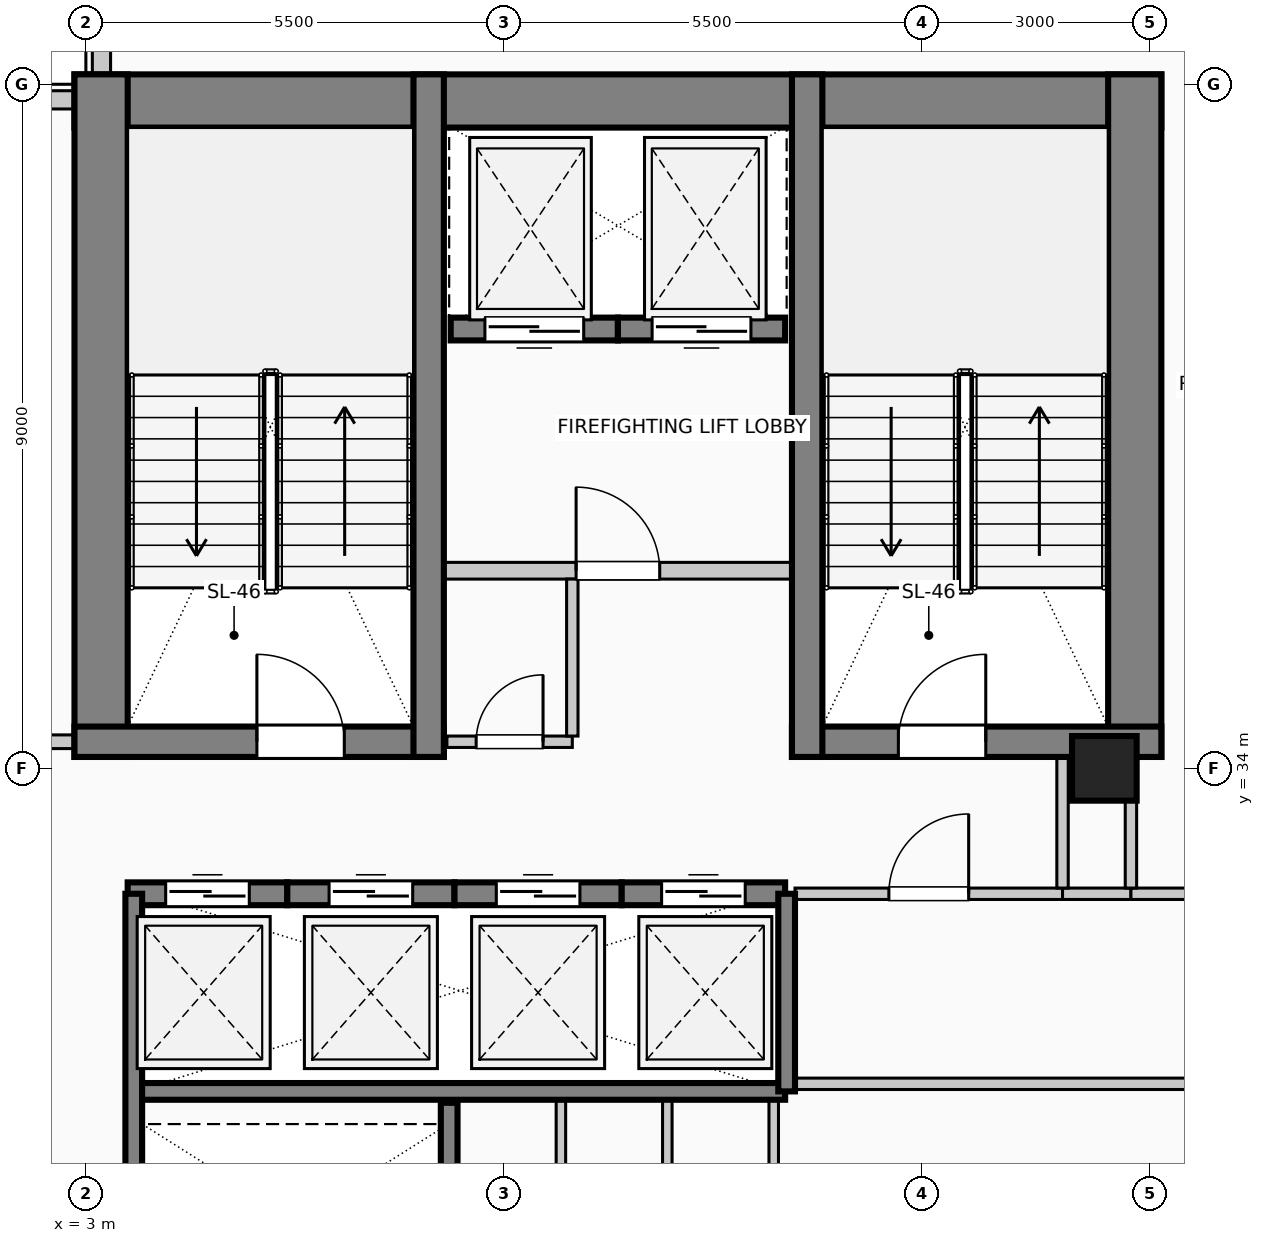
"""IFC4 building model, lengths in metres.
Left out: names, types, materials, properties, quantities, classifications, styles, units other than length and angle.
Written with IfcOpenShell. Run it as: python <this file> out.ifc"""

import sys

from ifc_helpers import new_model, si_unit, direction, frame, frame_2d, origin, origin_2d, place, context, subcontext, project, spatial, rectangle, circle, extrude, element, fill, save


model = new_model("IFC4")
c1 = context("Model", 3, precision=1e-05, world=origin(), true_north=direction((0.0, 1.0)))
c2 = subcontext(c1, "Body", "Model", "MODEL_VIEW")
j1 = project(units=[si_unit("LENGTHUNIT", "METRE"), si_unit("PLANEANGLEUNIT", "RADIAN")], contexts=[c1])
p1 = place(None, origin())
s1 = spatial("IfcSite", under=j1, at=p1, CompositionType="ELEMENT")
p2 = place(p1, origin())
s2 = spatial("IfcBuilding", under=s1, at=p2, CompositionType="ELEMENT")
p3 = place(p2, frame((0.0, 0.0, 256.6)))
s3 = spatial("IfcBuildingStorey", under=s2, at=p3, CompositionType="ELEMENT", Elevation=256.6)
p4 = place(p3, frame((2.85, 42.78, 0.0), z_axis=(0.0, 0.0, 1.0), x_axis=(1.0, 0.0, 0.0)))
e1 = element("IfcWall", 1, at=p4, inside=s3, PredefinedType="SHEAR", context=c2, shape_type="SweptSolid", body=[
    extrude(rectangle(XDim=14.3, YDim=0.7, at=frame_2d((7.15, 0.0))), origin(), (0.0, 0.0, 1.0), 4.0),
])
for number, where, z_axis, x_axis in (
    (2, (3.2, 34.15, 0.0), (0.0, 0.0, 1.0), (0.0, 1.0, 0.0)),
    (3, (16.8, 34.15, 0.0), (0.0, 0.0, 1.0), (0.0, 1.0, 0.0)),
):
    element("IfcWall", number, at=place(p3, frame(where, z_axis=z_axis, x_axis=x_axis)), inside=s3, PredefinedType="SHEAR", context=c2, shape_type="SweptSolid", body=[
        extrude(rectangle(XDim=8.98, YDim=0.7, at=frame_2d((4.49, 0.0))), origin(), (0.0, 0.0, 1.0), 4.0),
    ])
p5 = place(p3, frame((2.85, 34.35, 0.0), z_axis=(0.0, 0.0, 1.0), x_axis=(1.0, 0.0, 0.0)))
e4 = element("IfcWall", 4, at=p5, inside=s3, PredefinedType="SHEAR", context=c2, shape_type="SweptSolid", body=[
    extrude(rectangle(XDim=4.86, YDim=0.4, at=frame_2d((2.43, 0.0))), origin(), (0.0, 0.0, 1.0), 4.0),
])
p6 = place(p5, frame((2.4, 0.0, 0.0)))
e5 = element("IfcOpeningElement", 5, at=p6, cuts=e4, PredefinedType="OPENING", context=c2, shape_type="SweptSolid", body=[
    extrude(rectangle(XDim=1.15, YDim=2.2, at=frame_2d((0.575, 1.1))), frame((0.0, 0.21, 0.0), z_axis=(0.0, -1.0, 0.0), x_axis=(1.0, 0.0, 0.0)), (0.0, 0.0, 1.0), 0.42),
])
p7 = place(p3, frame((12.29, 34.35, 0.0), z_axis=(0.0, 0.0, 1.0), x_axis=(1.0, 0.0, 0.0)))
e6 = element("IfcWall", 6, at=p7, inside=s3, PredefinedType="SHEAR", context=c2, shape_type="SweptSolid", body=[
    extrude(rectangle(XDim=4.86, YDim=0.4, at=frame_2d((2.43, 0.0))), origin(), (0.0, 0.0, 1.0), 4.0),
])
p8 = place(p7, frame((1.4, 0.0, 0.0)))
e7 = element("IfcOpeningElement", 7, at=p8, cuts=e6, PredefinedType="OPENING", context=c2, shape_type="SweptSolid", body=[
    extrude(rectangle(XDim=1.15, YDim=2.2, at=frame_2d((0.575, 1.1))), frame((0.0, 0.21, 0.0), z_axis=(0.0, -1.0, 0.0), x_axis=(1.0, 0.0, 0.0)), (0.0, 0.0, 1.0), 0.42),
])
for number, where, z_axis, x_axis in (
    (8, (7.51, 34.15, 0.0), (0.0, 0.0, 1.0), (0.0, 1.0, 0.0)),
    (9, (12.49, 34.15, 0.0), (0.0, 0.0, 1.0), (0.0, 1.0, 0.0)),
):
    element("IfcWall", number, at=place(p3, frame(where, z_axis=z_axis, x_axis=x_axis)), inside=s3, PredefinedType="SHEAR", context=c2, shape_type="SweptSolid", body=[
        extrude(rectangle(XDim=8.98, YDim=0.4, at=frame_2d((4.49, 0.0))), origin(), (0.0, 0.0, 1.0), 4.0),
    ])
p9 = place(p3, frame((16.4, 34.0, 0.0), z_axis=(0.0, 0.0, 1.0), x_axis=(1.0, 0.0, 0.0)))
e10 = element("IfcColumn", 10, at=p9, inside=s3, PredefinedType="COLUMN", context=c2, shape_type="SweptSolid", body=[
    extrude(circle(Radius=0.425, at=origin_2d()), origin(), (0.0, 0.0, 1.0), 4.0),
])
p10 = place(p3, frame((0.6, 42.795, 0.0), z_axis=(0.0, 0.0, 1.0), x_axis=(1.0, 0.0, 0.0)))
e11 = element("IfcWall", 11, at=p10, inside=s3, PredefinedType="SOLIDWALL", context=c2, shape_type="SweptSolid", body=[
    extrude(rectangle(XDim=2.245, YDim=0.24, at=frame_2d((1.123, 0.0))), origin(), (0.0, 0.0, 1.0), 3.75),
])
p11 = place(p3, frame((3.205, 43.135, 0.0), z_axis=(0.0, 0.0, 1.0), x_axis=(0.0, 1.0, 0.0)))
e12 = element("IfcWall", 12, at=p11, inside=s3, PredefinedType="SOLIDWALL", context=c2, shape_type="SweptSolid", body=[
    extrude(rectangle(XDim=2.265, YDim=0.24, at=frame_2d((1.132, 0.0))), origin(), (0.0, 0.0, 1.0), 3.75),
])
p12 = place(p3, frame((3.55, 32.35, 0.0), z_axis=(0.0, 0.0, 1.0), x_axis=(1.0, 0.0, 0.0)))
e13 = element("IfcWall", 13, at=p12, inside=s3, PredefinedType="SOLIDWALL", context=c2, shape_type="SweptSolid", body=[
    extrude(rectangle(XDim=2.1, YDim=0.3, at=frame_2d((1.05, 0.0))), origin(), (0.0, 0.0, 1.0), 4.0),
])
p13 = place(p12, frame((0.5, 0.0, 0.0)))
e14 = element("IfcOpeningElement", 14, at=p13, cuts=e13, PredefinedType="OPENING", context=c2, shape_type="SweptSolid", body=[
    extrude(rectangle(XDim=1.1, YDim=2.2, at=frame_2d((0.55, 1.1))), frame((0.0, 0.16, 0.0), z_axis=(0.0, -1.0, 0.0), x_axis=(1.0, 0.0, 0.0)), (0.0, 0.0, 1.0), 0.32),
])
p14 = place(p3, frame((5.65, 32.35, 0.0), z_axis=(0.0, 0.0, 1.0), x_axis=(1.0, 0.0, 0.0)))
e15 = element("IfcWall", 15, at=p14, inside=s3, PredefinedType="SOLIDWALL", context=c2, shape_type="SweptSolid", body=[
    extrude(rectangle(XDim=2.2, YDim=0.3, at=frame_2d((1.1, 0.0))), origin(), (0.0, 0.0, 1.0), 4.0),
])
p15 = place(p14, frame((0.55, 0.0, 0.0)))
e16 = element("IfcOpeningElement", 16, at=p15, cuts=e15, PredefinedType="OPENING", context=c2, shape_type="SweptSolid", body=[
    extrude(rectangle(XDim=1.1, YDim=2.2, at=frame_2d((0.55, 1.1))), frame((0.0, 0.16, 0.0), z_axis=(0.0, -1.0, 0.0), x_axis=(1.0, 0.0, 0.0)), (0.0, 0.0, 1.0), 0.32),
])
p16 = place(p3, frame((7.85, 32.35, 0.0), z_axis=(0.0, 0.0, 1.0), x_axis=(1.0, 0.0, 0.0)))
e17 = element("IfcWall", 17, at=p16, inside=s3, PredefinedType="SOLIDWALL", context=c2, shape_type="SweptSolid", body=[
    extrude(rectangle(XDim=2.2, YDim=0.3, at=frame_2d((1.1, 0.0))), origin(), (0.0, 0.0, 1.0), 4.0),
])
p17 = place(p16, frame((0.55, 0.0, 0.0)))
e18 = element("IfcOpeningElement", 18, at=p17, cuts=e17, PredefinedType="OPENING", context=c2, shape_type="SweptSolid", body=[
    extrude(rectangle(XDim=1.1, YDim=2.2, at=frame_2d((0.55, 1.1))), frame((0.0, 0.16, 0.0), z_axis=(0.0, -1.0, 0.0), x_axis=(1.0, 0.0, 0.0)), (0.0, 0.0, 1.0), 0.32),
])
p18 = place(p3, frame((10.05, 32.35, 0.0), z_axis=(0.0, 0.0, 1.0), x_axis=(1.0, 0.0, 0.0)))
e19 = element("IfcWall", 19, at=p18, inside=s3, PredefinedType="SOLIDWALL", context=c2, shape_type="SweptSolid", body=[
    extrude(rectangle(XDim=2.15, YDim=0.3, at=frame_2d((1.075, 0.0))), origin(), (0.0, 0.0, 1.0), 4.0),
])
p19 = place(p18, frame((0.525, 0.0, 0.0)))
e20 = element("IfcOpeningElement", 20, at=p19, cuts=e19, PredefinedType="OPENING", context=c2, shape_type="SweptSolid", body=[
    extrude(rectangle(XDim=1.1, YDim=2.2, at=frame_2d((0.55, 1.1))), frame((0.0, 0.16, 0.0), z_axis=(0.0, -1.0, 0.0), x_axis=(1.0, 0.0, 0.0)), (0.0, 0.0, 1.0), 0.32),
])
p20 = place(p3, frame((10.0, 39.78, 0.0), z_axis=(0.0, 0.0, 1.0), x_axis=(-1.0, 0.0, 0.0)))
e21 = element("IfcWall", 21, at=p20, inside=s3, PredefinedType="SOLIDWALL", context=c2, shape_type="SweptSolid", body=[
    extrude(rectangle(XDim=2.2, YDim=0.3, at=frame_2d((1.1, 0.0))), origin(), (0.0, 0.0, 1.0), 4.0),
])
p21 = place(p20, frame((0.45, 0.0, 0.0)))
e22 = element("IfcOpeningElement", 22, at=p21, cuts=e21, PredefinedType="OPENING", context=c2, shape_type="SweptSolid", body=[
    extrude(rectangle(XDim=1.3, YDim=2.25, at=frame_2d((0.65, 1.125))), frame((0.0, 0.16, 0.0), z_axis=(0.0, -1.0, 0.0), x_axis=(1.0, 0.0, 0.0)), (0.0, 0.0, 1.0), 0.32),
])
p22 = place(p3, frame((12.2, 39.78, 0.0), z_axis=(0.0, 0.0, 1.0), x_axis=(-1.0, 0.0, 0.0)))
e23 = element("IfcWall", 23, at=p22, inside=s3, PredefinedType="SOLIDWALL", context=c2, shape_type="SweptSolid", body=[
    extrude(rectangle(XDim=2.2, YDim=0.3, at=frame_2d((1.1, 0.0))), origin(), (0.0, 0.0, 1.0), 4.0),
])
p23 = place(p22, frame((0.45, 0.0, 0.0)))
e24 = element("IfcOpeningElement", 24, at=p23, cuts=e23, PredefinedType="OPENING", context=c2, shape_type="SweptSolid", body=[
    extrude(rectangle(XDim=1.3, YDim=2.25, at=frame_2d((0.65, 1.125))), frame((0.0, 0.16, 0.0), z_axis=(0.0, -1.0, 0.0), x_axis=(1.0, 0.0, 0.0)), (0.0, 0.0, 1.0), 0.32),
])
p24 = place(p3, frame((3.55, 29.75, 0.0), z_axis=(0.0, 0.0, 1.0), x_axis=(1.0, 0.0, 0.0)))
e25 = element("IfcWall", 25, at=p24, inside=s3, PredefinedType="SOLIDWALL", context=c2, shape_type="SweptSolid", body=[
    extrude(rectangle(XDim=8.65, YDim=0.22, at=frame_2d((4.325, 0.0))), origin(), (0.0, 0.0, 1.0), 4.0),
])
p25 = place(p3, frame((3.63, 26.8, 0.0), z_axis=(0.0, 0.0, 1.0), x_axis=(0.0, 1.0, 0.0)))
e26 = element("IfcWall", 26, at=p25, inside=s3, PredefinedType="SOLIDWALL", context=c2, shape_type="SweptSolid", body=[
    extrude(rectangle(XDim=5.55, YDim=0.22, at=frame_2d((2.775, 0.0))), origin(), (0.0, 0.0, 1.0), 4.0),
])
p26 = place(p3, frame((7.78, 26.8, 0.0), z_axis=(0.0, 0.0, 1.0), x_axis=(0.0, 1.0, 0.0)))
e27 = element("IfcWall", 27, at=p26, inside=s3, PredefinedType="SOLIDWALL", context=c2, shape_type="SweptSolid", body=[
    extrude(rectangle(XDim=2.8, YDim=0.22, at=frame_2d((1.4, 0.0))), origin(), (0.0, 0.0, 1.0), 4.0),
])
p27 = place(p3, frame((12.22, 29.75, 0.0), z_axis=(0.0, 0.0, 1.0), x_axis=(0.0, 1.0, 0.0)))
e28 = element("IfcWall", 28, at=p27, inside=s3, PredefinedType="SOLIDWALL", context=c2, shape_type="SweptSolid", body=[
    extrude(rectangle(XDim=2.6, YDim=0.22, at=frame_2d((1.3, 0.0))), origin(), (0.0, 0.0, 1.0), 4.0),
])
p28 = place(p3, frame((7.51, 36.6, 0.0), z_axis=(0.0, 0.0, 1.0), x_axis=(1.0, 0.0, 0.0)))
e29 = element("IfcWall", 29, at=p28, inside=s3, PredefinedType="PARTITIONING", context=c2, shape_type="SweptSolid", body=[
    extrude(rectangle(XDim=4.98, YDim=0.22, at=frame_2d((2.49, 0.0))), origin(), (0.0, 0.0, 1.0), 3.75),
])
p29 = place(p28, frame((1.94, 0.0, 0.0)))
e30 = element("IfcOpeningElement", 30, at=p29, cuts=e29, PredefinedType="OPENING", context=c2, shape_type="SweptSolid", body=[
    extrude(rectangle(XDim=1.1, YDim=2.2, at=frame_2d((0.55, 1.1))), frame((0.0, 0.12, 0.0), z_axis=(0.0, -1.0, 0.0), x_axis=(1.0, 0.0, 0.0)), (0.0, 0.0, 1.0), 0.24),
])
p30 = place(p3, frame((12.33, 29.85, 0.0), z_axis=(0.0, 0.0, 1.0), x_axis=(1.0, 0.0, 0.0)))
e31 = element("IfcWall", 31, at=p30, inside=s3, PredefinedType="PARTITIONING", context=c2, shape_type="SweptSolid", body=[
    extrude(rectangle(XDim=8.67, YDim=0.15, at=frame_2d((4.335, 0.0))), origin(), (0.0, 0.0, 1.0), 3.75),
])
p31 = place(p3, frame((12.33, 32.35, 0.0), z_axis=(0.0, 0.0, 1.0), x_axis=(1.0, 0.0, 0.0)))
e32 = element("IfcWall", 32, at=p31, inside=s3, PredefinedType="PARTITIONING", context=c2, shape_type="SweptSolid", body=[
    extrude(rectangle(XDim=3.52, YDim=0.15, at=frame_2d((1.76, 0.0))), origin(), (0.0, 0.0, 1.0), 3.75),
])
p32 = place(p31, frame((1.235, 0.0, 0.0)))
e33 = element("IfcOpeningElement", 33, at=p32, cuts=e32, PredefinedType="OPENING", context=c2, shape_type="SweptSolid", body=[
    extrude(rectangle(XDim=1.05, YDim=2.15, at=frame_2d((0.525, 1.075))), frame((0.0, 0.085, 0.0), z_axis=(0.0, -1.0, 0.0), x_axis=(1.0, 0.0, 0.0)), (0.0, 0.0, 1.0), 0.17),
])
p33 = place(p3, frame((15.85, 32.35, 0.0), z_axis=(0.0, 0.0, 1.0), x_axis=(1.0, 0.0, 0.0)))
e34 = element("IfcWall", 34, at=p33, inside=s3, PredefinedType="PARTITIONING", context=c2, shape_type="SweptSolid", body=[
    extrude(rectangle(XDim=0.9, YDim=0.15, at=frame_2d((0.45, 0.0))), origin(), (0.0, 0.0, 1.0), 3.75),
])
p34 = place(p3, frame((16.75, 32.35, 0.0), z_axis=(0.0, 0.0, 1.0), x_axis=(1.0, 0.0, 0.0)))
e35 = element("IfcWall", 35, at=p34, inside=s3, PredefinedType="PARTITIONING", context=c2, shape_type="SweptSolid", body=[
    extrude(rectangle(XDim=4.25, YDim=0.15, at=frame_2d((2.125, 0.0))), origin(), (0.0, 0.0, 1.0), 3.75),
])
p35 = place(p3, frame((1.1, 34.35, 0.0), z_axis=(0.0, 0.0, 1.0), x_axis=(1.0, 0.0, 0.0)))
e36 = element("IfcWall", 36, at=p35, inside=s3, PredefinedType="PARTITIONING", context=c2, shape_type="SweptSolid", body=[
    extrude(rectangle(XDim=1.75, YDim=0.18, at=frame_2d((0.875, 0.0))), origin(), (0.0, 0.0, 1.0), 3.75),
])
p36 = place(p3, frame((7.75, 34.35, 0.0), z_axis=(0.0, 0.0, 1.0), x_axis=(1.0, 0.0, 0.0)))
e37 = element("IfcWall", 37, at=p36, inside=s3, PredefinedType="PARTITIONING", context=c2, shape_type="SweptSolid", body=[
    extrude(rectangle(XDim=1.65, YDim=0.15, at=frame_2d((0.825, 0.0))), origin(), (0.0, 0.0, 1.0), 3.75),
])
p37 = place(p36, frame((0.385, 0.0, 0.0)))
e38 = element("IfcOpeningElement", 38, at=p37, cuts=e37, PredefinedType="OPENING", context=c2, shape_type="SweptSolid", body=[
    extrude(rectangle(XDim=0.88, YDim=2.1, at=frame_2d((0.44, 1.05))), frame((0.0, 0.085, 0.0), z_axis=(0.0, -1.0, 0.0), x_axis=(1.0, 0.0, 0.0)), (0.0, 0.0, 1.0), 0.17),
])
p38 = place(p3, frame((9.25, 26.863, 0.0), z_axis=(0.0, 0.0, 1.0), x_axis=(0.0, 1.0, 0.0)))
e39 = element("IfcWall", 39, at=p38, inside=s3, PredefinedType="PARTITIONING", context=c2, shape_type="SweptSolid", body=[
    extrude(rectangle(XDim=2.777, YDim=0.125, at=frame_2d((1.389, 0.0))), origin(), (0.0, 0.0, 1.0), 3.75),
])
p39 = place(p3, frame((9.4, 34.425, 0.0), z_axis=(0.0, 0.0, 1.0), x_axis=(0.0, 1.0, 0.0)))
e40 = element("IfcWall", 40, at=p39, inside=s3, PredefinedType="PARTITIONING", context=c2, shape_type="SweptSolid", body=[
    extrude(rectangle(XDim=2.065, YDim=0.15, at=frame_2d((1.032, 0.0))), origin(), (0.0, 0.0, 1.0), 3.75),
])
for number, where, z_axis, x_axis in (
    (41, (10.65, 26.863, 0.0), (0.0, 0.0, 1.0), (0.0, 1.0, 0.0)),
    (42, (12.05, 26.863, 0.0), (0.0, 0.0, 1.0), (0.0, 1.0, 0.0)),
):
    element("IfcWall", number, at=place(p3, frame(where, z_axis=z_axis, x_axis=x_axis)), inside=s3, PredefinedType="PARTITIONING", context=c2, shape_type="SweptSolid", body=[
        extrude(rectangle(XDim=2.777, YDim=0.125, at=frame_2d((1.389, 0.0))), origin(), (0.0, 0.0, 1.0), 3.75),
    ])
p40 = place(p3, frame((15.85, 32.425, 0.0), z_axis=(0.0, 0.0, 1.0), x_axis=(0.0, 1.0, 0.0)))
e43 = element("IfcWall", 43, at=p40, inside=s3, PredefinedType="PARTITIONING", context=c2, shape_type="SweptSolid", body=[
    extrude(rectangle(XDim=1.725, YDim=0.15, at=frame_2d((0.862, 0.0))), origin(), (0.0, 0.0, 1.0), 3.75),
])
p41 = place(p3, frame((16.75, 32.425, 0.0), z_axis=(0.0, 0.0, 1.0), x_axis=(0.0, 1.0, 0.0)))
e44 = element("IfcWall", 44, at=p41, inside=s3, PredefinedType="PARTITIONING", context=c2, shape_type="SweptSolid", body=[
    extrude(rectangle(XDim=1.15, YDim=0.15, at=frame_2d((0.575, 0.0))), origin(), (0.0, 0.0, 1.0), 3.75),
])
p42 = place(p13, origin())
e45 = element("IfcDoor", 45, at=p42, inside=s3, OperationType="SLIDING_TO_LEFT", PredefinedType="DOOR", context=c2, shape_type="SweptSolid", body=[
    extrude(rectangle(XDim=1.1, YDim=2.2, at=frame_2d((0.55, 1.1))), frame((0.0, 0.025, 0.0), z_axis=(0.0, -1.0, 0.0), x_axis=(1.0, 0.0, 0.0)), (0.0, 0.0, 1.0), 0.05),
])
fill(e14, e45)
p43 = place(p15, origin())
e46 = element("IfcDoor", 46, at=p43, inside=s3, OperationType="SLIDING_TO_RIGHT", PredefinedType="DOOR", context=c2, shape_type="SweptSolid", body=[
    extrude(rectangle(XDim=1.1, YDim=2.2, at=frame_2d((0.55, 1.1))), frame((0.0, 0.025, 0.0), z_axis=(0.0, -1.0, 0.0), x_axis=(1.0, 0.0, 0.0)), (0.0, 0.0, 1.0), 0.05),
])
fill(e16, e46)
p44 = place(p17, origin())
e47 = element("IfcDoor", 47, at=p44, inside=s3, OperationType="SLIDING_TO_LEFT", PredefinedType="DOOR", context=c2, shape_type="SweptSolid", body=[
    extrude(rectangle(XDim=1.1, YDim=2.2, at=frame_2d((0.55, 1.1))), frame((0.0, 0.025, 0.0), z_axis=(0.0, -1.0, 0.0), x_axis=(1.0, 0.0, 0.0)), (0.0, 0.0, 1.0), 0.05),
])
fill(e18, e47)
p45 = place(p19, origin())
e48 = element("IfcDoor", 48, at=p45, inside=s3, OperationType="SLIDING_TO_RIGHT", PredefinedType="DOOR", context=c2, shape_type="SweptSolid", body=[
    extrude(rectangle(XDim=1.1, YDim=2.2, at=frame_2d((0.55, 1.1))), frame((0.0, 0.025, 0.0), z_axis=(0.0, -1.0, 0.0), x_axis=(1.0, 0.0, 0.0)), (0.0, 0.0, 1.0), 0.05),
])
fill(e20, e48)
p46 = place(p21, origin())
e49 = element("IfcDoor", 49, at=p46, inside=s3, OperationType="SLIDING_TO_LEFT", PredefinedType="DOOR", context=c2, shape_type="SweptSolid", body=[
    extrude(rectangle(XDim=1.3, YDim=2.25, at=frame_2d((0.65, 1.125))), frame((0.0, 0.025, 0.0), z_axis=(0.0, -1.0, 0.0), x_axis=(1.0, 0.0, 0.0)), (0.0, 0.0, 1.0), 0.05),
])
fill(e22, e49)
p47 = place(p23, origin())
e50 = element("IfcDoor", 50, at=p47, inside=s3, OperationType="SLIDING_TO_RIGHT", PredefinedType="DOOR", context=c2, shape_type="SweptSolid", body=[
    extrude(rectangle(XDim=1.3, YDim=2.25, at=frame_2d((0.65, 1.125))), frame((0.0, 0.025, 0.0), z_axis=(0.0, -1.0, 0.0), x_axis=(1.0, 0.0, 0.0)), (0.0, 0.0, 1.0), 0.05),
])
fill(e24, e50)
p48 = place(p6, origin())
e51 = element("IfcDoor", 51, at=p48, inside=s3, OperationType="SINGLE_SWING_LEFT", PredefinedType="DOOR", context=c2, shape_type="SweptSolid", body=[
    extrude(rectangle(XDim=1.15, YDim=2.2, at=frame_2d((0.575, 1.1))), frame((0.0, 0.025, 0.0), z_axis=(0.0, -1.0, 0.0), x_axis=(1.0, 0.0, 0.0)), (0.0, 0.0, 1.0), 0.05),
])
fill(e5, e51)
p49 = place(p8, origin())
e52 = element("IfcDoor", 52, at=p49, inside=s3, OperationType="SINGLE_SWING_RIGHT", PredefinedType="DOOR", context=c2, shape_type="SweptSolid", body=[
    extrude(rectangle(XDim=1.15, YDim=2.2, at=frame_2d((0.575, 1.1))), frame((0.0, 0.025, 0.0), z_axis=(0.0, -1.0, 0.0), x_axis=(1.0, 0.0, 0.0)), (0.0, 0.0, 1.0), 0.05),
])
fill(e7, e52)
p50 = place(p29, origin())
e53 = element("IfcDoor", 53, at=p50, inside=s3, OperationType="SINGLE_SWING_LEFT", PredefinedType="DOOR", context=c2, shape_type="SweptSolid", body=[
    extrude(rectangle(XDim=1.1, YDim=2.2, at=frame_2d((0.55, 1.1))), frame((0.0, 0.025, 0.0), z_axis=(0.0, -1.0, 0.0), x_axis=(1.0, 0.0, 0.0)), (0.0, 0.0, 1.0), 0.05),
])
fill(e30, e53)
p51 = place(p32, origin())
e54 = element("IfcDoor", 54, at=p51, inside=s3, OperationType="SINGLE_SWING_RIGHT", PredefinedType="DOOR", context=c2, shape_type="SweptSolid", body=[
    extrude(rectangle(XDim=1.05, YDim=2.15, at=frame_2d((0.525, 1.075))), frame((0.0, 0.025, 0.0), z_axis=(0.0, -1.0, 0.0), x_axis=(1.0, 0.0, 0.0)), (0.0, 0.0, 1.0), 0.05),
])
fill(e33, e54)
p52 = place(p37, origin())
e55 = element("IfcDoor", 55, at=p52, inside=s3, OperationType="SINGLE_SWING_RIGHT", PredefinedType="DOOR", context=c2, shape_type="SweptSolid", body=[
    extrude(rectangle(XDim=0.88, YDim=2.1, at=frame_2d((0.44, 1.05))), frame((0.0, 0.025, 0.0), z_axis=(0.0, -1.0, 0.0), x_axis=(1.0, 0.0, 0.0)), (0.0, 0.0, 1.0), 0.05),
])
fill(e38, e55)
save(model, sys.argv[1])
